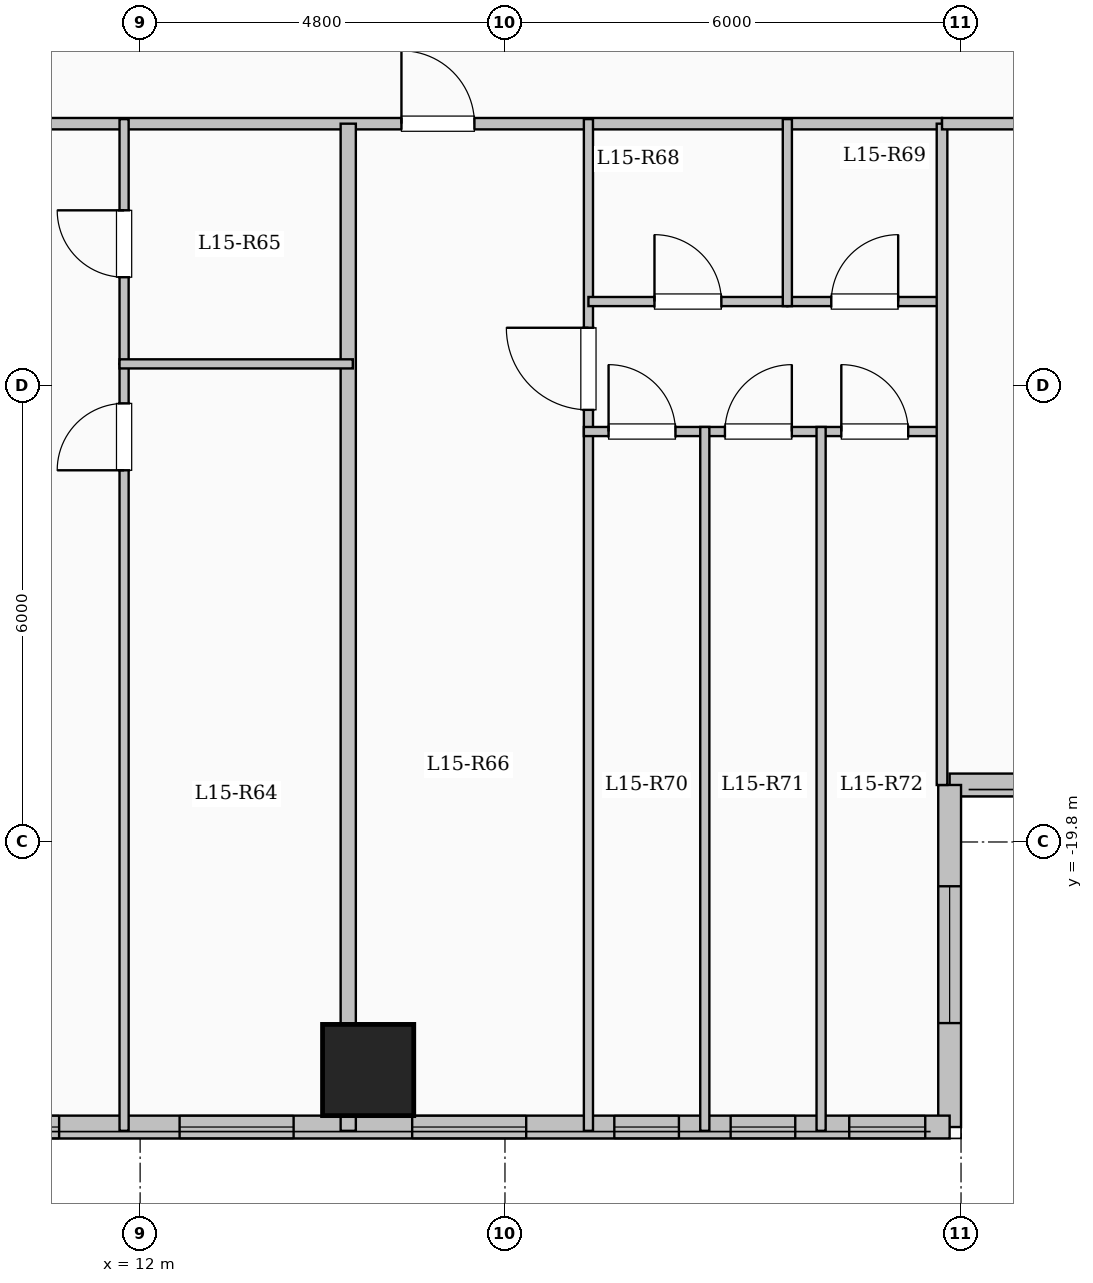
"""IFC4 building model, lengths in metres.
Left out: names, types, materials, properties, quantities, classifications, styles, units other than length and angle.
Written with IfcOpenShell. Run it as: python <this file> out.ifc"""

import sys

from ifc_helpers import new_model, si_unit, direction, frame, frame_2d, origin, origin_2d, place, context, subcontext, project, spatial, rectangle, extrude, element, fill, save


model = new_model("IFC4")
c1 = context("Model", 3, precision=1e-05, world=origin(), true_north=direction((0.0, 1.0)))
c2 = subcontext(c1, "Body", "Model", "MODEL_VIEW")
j1 = project(units=[si_unit("LENGTHUNIT", "METRE"), si_unit("PLANEANGLEUNIT", "RADIAN")], contexts=[c1])
p1 = place(None, origin())
s1 = spatial("IfcSite", under=j1, at=p1, CompositionType="ELEMENT")
p2 = place(p1, origin())
s2 = spatial("IfcBuilding", under=s1, at=p2, CompositionType="ELEMENT")
p3 = place(p2, frame((0.0, 0.0, 57.5)))
s3 = spatial("IfcBuildingStorey", under=s2, at=p3, CompositionType="ELEMENT", Elevation=57.5)
p4 = place(p3, frame((15.0, -22.8, 0.0), z_axis=(0.0, 0.0, 1.0), x_axis=(1.0, 0.0, 0.0)))
e1 = element("IfcColumn", 1, at=p4, inside=s3, PredefinedType="COLUMN", context=c2, shape_type="SweptSolid", body=[
    extrude(rectangle(XDim=1.2, YDim=1.2, at=origin_2d()), origin(), (0.0, 0.0, 1.0), 3.35),
])
p5 = place(p3, frame((28.65, -19.05, 0.0), z_axis=(0.0, 0.0, 1.0), x_axis=(-1.0, 0.0, 0.0)))
e2 = element("IfcWall", 2, at=p5, inside=s3, PredefinedType="SOLIDWALL", context=c2, shape_type="SweptSolid", body=[
    extrude(rectangle(XDim=6.0, YDim=0.3, at=frame_2d((3.0, 0.0))), origin(), (0.0, 0.0, 1.0), 3.1),
])
p6 = place(p5, frame((1.825, 0.0, 0.9)))
e3 = element("IfcOpeningElement", 3, at=p6, cuts=e2, PredefinedType="OPENING", context=c2, shape_type="SweptSolid", body=[
    extrude(rectangle(XDim=2.4, YDim=1.8, at=frame_2d((1.2, 0.9))), frame((0.0, 0.16, 0.0), z_axis=(0.0, -1.0, 0.0), x_axis=(1.0, 0.0, 0.0)), (0.0, 0.0, 1.0), 0.32),
])
p7 = place(p3, frame((22.65, -19.05, 0.0), z_axis=(0.0, 0.0, 1.0), x_axis=(0.0, -1.0, 0.0)))
e4 = element("IfcWall", 4, at=p7, inside=s3, PredefinedType="SOLIDWALL", context=c2, shape_type="SweptSolid", body=[
    extrude(rectangle(XDim=4.5, YDim=0.3, at=frame_2d((2.25, 0.0))), origin(), (0.0, 0.0, 1.0), 3.1),
])
p8 = place(p7, frame((1.333, 0.0, 0.9)))
e5 = element("IfcOpeningElement", 5, at=p8, cuts=e4, PredefinedType="OPENING", context=c2, shape_type="SweptSolid", body=[
    extrude(rectangle(XDim=1.8, YDim=1.65, at=frame_2d((0.9, 0.825))), frame((0.0, 0.16, 0.0), z_axis=(0.0, -1.0, 0.0), x_axis=(1.0, 0.0, 0.0)), (0.0, 0.0, 1.0), 0.32),
])
p9 = place(p3, frame((22.65, -23.55, 0.0), z_axis=(0.0, 0.0, 1.0), x_axis=(-1.0, 0.0, 0.0)))
e6 = element("IfcWall", 6, at=p9, inside=s3, PredefinedType="SOLIDWALL", context=c2, shape_type="SweptSolid", body=[
    extrude(rectangle(XDim=15.3, YDim=0.3, at=frame_2d((7.65, 0.0))), origin(), (0.0, 0.0, 1.0), 3.1),
])
p10 = place(p9, frame((0.321, 0.0, 0.95)))
e7 = element("IfcOpeningElement", 7, at=p10, cuts=e6, PredefinedType="OPENING", context=c2, shape_type="SweptSolid", body=[
    extrude(rectangle(XDim=1.0, YDim=1.5, at=frame_2d((0.5, 0.75))), frame((0.0, 0.16, 0.0), z_axis=(0.0, -1.0, 0.0), x_axis=(1.0, 0.0, 0.0)), (0.0, 0.0, 1.0), 0.32),
])
p11 = place(p9, frame((2.031, 0.0, 0.95)))
e8 = element("IfcOpeningElement", 8, at=p11, cuts=e6, PredefinedType="OPENING", context=c2, shape_type="SweptSolid", body=[
    extrude(rectangle(XDim=0.85, YDim=1.5, at=frame_2d((0.425, 0.75))), frame((0.0, 0.16, 0.0), z_axis=(0.0, -1.0, 0.0), x_axis=(1.0, 0.0, 0.0)), (0.0, 0.0, 1.0), 0.32),
])
p12 = place(p9, frame((3.562, 0.0, 0.95)))
e9 = element("IfcOpeningElement", 9, at=p12, cuts=e6, PredefinedType="OPENING", context=c2, shape_type="SweptSolid", body=[
    extrude(rectangle(XDim=0.85, YDim=1.5, at=frame_2d((0.425, 0.75))), frame((0.0, 0.16, 0.0), z_axis=(0.0, -1.0, 0.0), x_axis=(1.0, 0.0, 0.0)), (0.0, 0.0, 1.0), 0.32),
])
p13 = place(p9, frame((5.571, 0.0, 0.9)))
e10 = element("IfcOpeningElement", 10, at=p13, cuts=e6, PredefinedType="OPENING", context=c2, shape_type="SweptSolid", body=[
    extrude(rectangle(XDim=1.5, YDim=1.65, at=frame_2d((0.75, 0.825))), frame((0.0, 0.16, 0.0), z_axis=(0.0, -1.0, 0.0), x_axis=(1.0, 0.0, 0.0)), (0.0, 0.0, 1.0), 0.32),
])
p14 = place(p9, frame((8.631, 0.0, 0.9)))
e11 = element("IfcOpeningElement", 11, at=p14, cuts=e6, PredefinedType="OPENING", context=c2, shape_type="SweptSolid", body=[
    extrude(rectangle(XDim=1.5, YDim=1.65, at=frame_2d((0.75, 0.825))), frame((0.0, 0.16, 0.0), z_axis=(0.0, -1.0, 0.0), x_axis=(1.0, 0.0, 0.0)), (0.0, 0.0, 1.0), 0.32),
])
p15 = place(p9, frame((11.716, 0.0, 0.9)))
e12 = element("IfcOpeningElement", 12, at=p15, cuts=e6, PredefinedType="OPENING", context=c2, shape_type="SweptSolid", body=[
    extrude(rectangle(XDim=1.5, YDim=1.65, at=frame_2d((0.75, 0.825))), frame((0.0, 0.16, 0.0), z_axis=(0.0, -1.0, 0.0), x_axis=(1.0, 0.0, 0.0)), (0.0, 0.0, 1.0), 0.32),
])
p16 = place(p9, frame((14.303, 0.0, 0.95)))
e13 = element("IfcOpeningElement", 13, at=p16, cuts=e6, PredefinedType="OPENING", context=c2, shape_type="SweptSolid", body=[
    extrude(rectangle(XDim=0.85, YDim=1.5, at=frame_2d((0.425, 0.75))), frame((0.0, 0.16, 0.0), z_axis=(0.0, -1.0, 0.0), x_axis=(1.0, 0.0, 0.0)), (0.0, 0.0, 1.0), 0.32),
])
p17 = place(p3, frame((8.55, -10.35, 0.0), z_axis=(0.0, 0.0, 1.0), x_axis=(1.0, 0.0, 0.0)))
e14 = element("IfcWall", 14, at=p17, inside=s3, PredefinedType="PARTITIONING", context=c2, shape_type="SweptSolid", body=[
    extrude(rectangle(XDim=14.0, YDim=0.15, at=frame_2d((7.0, 0.0))), origin(), (0.0, 0.0, 1.0), 3.1),
])
p18 = place(p17, frame((0.75, 0.0, 0.0)))
e15 = element("IfcOpeningElement", 15, at=p18, cuts=e14, PredefinedType="OPENING", context=c2, shape_type="SweptSolid", body=[
    extrude(rectangle(XDim=0.96, YDim=2.15, at=frame_2d((0.48, 1.075))), frame((0.0, 0.085, 0.0), z_axis=(0.0, -1.0, 0.0), x_axis=(1.0, 0.0, 0.0)), (0.0, 0.0, 1.0), 0.17),
])
p19 = place(p17, frame((6.888, 0.0, 0.0)))
e16 = element("IfcOpeningElement", 16, at=p19, cuts=e14, PredefinedType="OPENING", context=c2, shape_type="SweptSolid", body=[
    extrude(rectangle(XDim=0.96, YDim=2.15, at=frame_2d((0.48, 1.075))), frame((0.0, 0.085, 0.0), z_axis=(0.0, -1.0, 0.0), x_axis=(1.0, 0.0, 0.0)), (0.0, 0.0, 1.0), 0.17),
])
p20 = place(p3, frame((14.738, -23.6, 0.0), z_axis=(0.0, 0.0, 1.0), x_axis=(0.0, 1.0, 0.0)))
e17 = element("IfcWall", 17, at=p20, inside=s3, PredefinedType="SOLIDWALL", context=c2, shape_type="SweptSolid", body=[
    extrude(rectangle(XDim=13.25, YDim=0.2, at=frame_2d((6.625, 0.0))), origin(), (0.0, 0.0, 1.0), 2.435),
])
p21 = place(p3, frame((11.789, -23.6, 0.0), z_axis=(0.0, 0.0, 1.0), x_axis=(0.0, 1.0, 0.0)))
e18 = element("IfcWall", 18, at=p21, inside=s3, PredefinedType="PARTITIONING", context=c2, shape_type="SweptSolid", body=[
    extrude(rectangle(XDim=10.09, YDim=0.12, at=frame_2d((5.045, 0.0))), origin(), (0.0, 0.0, 1.0), 3.1),
])
p22 = place(p21, frame((8.69, 0.0, 0.0)))
e19 = element("IfcOpeningElement", 19, at=p22, cuts=e18, PredefinedType="OPENING", context=c2, shape_type="SweptSolid", body=[
    extrude(rectangle(XDim=0.88, YDim=2.1, at=frame_2d((0.44, 1.05))), frame((0.0, 0.07, 0.0), z_axis=(0.0, -1.0, 0.0), x_axis=(1.0, 0.0, 0.0)), (0.0, 0.0, 1.0), 0.14),
])
p23 = place(p3, frame((11.789, -13.51, 0.0), z_axis=(0.0, 0.0, 1.0), x_axis=(0.0, 1.0, 0.0)))
e20 = element("IfcWall", 20, at=p23, inside=s3, PredefinedType="PARTITIONING", context=c2, shape_type="SweptSolid", body=[
    extrude(rectangle(XDim=3.22, YDim=0.12, at=frame_2d((1.61, 0.0))), origin(), (0.0, 0.0, 1.0), 3.1),
])
p24 = place(p23, frame((1.14, 0.0, 0.0)))
e21 = element("IfcOpeningElement", 21, at=p24, cuts=e20, PredefinedType="OPENING", context=c2, shape_type="SweptSolid", body=[
    extrude(rectangle(XDim=0.88, YDim=2.1, at=frame_2d((0.44, 1.05))), frame((0.0, 0.07, 0.0), z_axis=(0.0, -1.0, 0.0), x_axis=(1.0, 0.0, 0.0)), (0.0, 0.0, 1.0), 0.14),
])
p25 = place(p3, frame((11.729, -13.51, 0.0), z_axis=(0.0, 0.0, 1.0), x_axis=(1.0, 0.0, 0.0)))
e22 = element("IfcWall", 22, at=p25, inside=s3, PredefinedType="PARTITIONING", context=c2, shape_type="SweptSolid", body=[
    extrude(rectangle(XDim=3.069, YDim=0.12, at=frame_2d((1.535, 0.0))), origin(), (0.0, 0.0, 1.0), 3.1),
])
p26 = place(p3, frame((17.898, -23.6, 0.0), z_axis=(0.0, 0.0, 1.0), x_axis=(0.0, 1.0, 0.0)))
e23 = element("IfcWall", 23, at=p26, inside=s3, PredefinedType="PARTITIONING", context=c2, shape_type="SweptSolid", body=[
    extrude(rectangle(XDim=13.31, YDim=0.12, at=frame_2d((6.655, 0.0))), origin(), (0.0, 0.0, 1.0), 3.1),
])
p27 = place(p26, frame((9.485, 0.0, 0.0)))
e24 = element("IfcOpeningElement", 24, at=p27, cuts=e23, PredefinedType="OPENING", context=c2, shape_type="SweptSolid", body=[
    extrude(rectangle(XDim=1.08, YDim=2.15, at=frame_2d((0.54, 1.075))), frame((0.0, 0.07, 0.0), z_axis=(0.0, -1.0, 0.0), x_axis=(1.0, 0.0, 0.0)), (0.0, 0.0, 1.0), 0.14),
])
p28 = place(p3, frame((17.898, -12.69, 0.0), z_axis=(0.0, 0.0, 1.0), x_axis=(1.0, 0.0, 0.0)))
e25 = element("IfcWall", 25, at=p28, inside=s3, PredefinedType="PARTITIONING", context=c2, shape_type="SweptSolid", body=[
    extrude(rectangle(XDim=2.617, YDim=0.12, at=frame_2d((1.309, 0.0))), origin(), (0.0, 0.0, 1.0), 3.1),
])
p29 = place(p28, frame((0.869, 0.0, 0.0)))
e26 = element("IfcOpeningElement", 26, at=p29, cuts=e25, PredefinedType="OPENING", context=c2, shape_type="SweptSolid", body=[
    extrude(rectangle(XDim=0.88, YDim=2.1, at=frame_2d((0.44, 1.05))), frame((0.0, 0.07, 0.0), z_axis=(0.0, -1.0, 0.0), x_axis=(1.0, 0.0, 0.0)), (0.0, 0.0, 1.0), 0.14),
])
p30 = place(p3, frame((20.515, -12.69, 0.0), z_axis=(0.0, 0.0, 1.0), x_axis=(1.0, 0.0, 0.0)))
e27 = element("IfcWall", 27, at=p30, inside=s3, PredefinedType="PARTITIONING", context=c2, shape_type="SweptSolid", body=[
    extrude(rectangle(XDim=2.035, YDim=0.12, at=frame_2d((1.018, 0.0))), origin(), (0.0, 0.0, 1.0), 3.1),
])
p31 = place(p30, frame((0.578, 0.0, 0.0)))
e28 = element("IfcOpeningElement", 28, at=p31, cuts=e27, PredefinedType="OPENING", context=c2, shape_type="SweptSolid", body=[
    extrude(rectangle(XDim=0.88, YDim=2.1, at=frame_2d((0.44, 1.05))), frame((0.0, 0.07, 0.0), z_axis=(0.0, -1.0, 0.0), x_axis=(1.0, 0.0, 0.0)), (0.0, 0.0, 1.0), 0.14),
])
p32 = place(p3, frame((17.838, -14.4, 0.0), z_axis=(0.0, 0.0, 1.0), x_axis=(1.0, 0.0, 0.0)))
e29 = element("IfcWall", 29, at=p32, inside=s3, PredefinedType="PARTITIONING", context=c2, shape_type="SweptSolid", body=[
    extrude(rectangle(XDim=4.772, YDim=0.12, at=frame_2d((2.386, 0.0))), origin(), (0.0, 0.0, 1.0), 3.1),
])
p33 = place(p32, frame((0.325, 0.0, 0.0)))
e30 = element("IfcOpeningElement", 30, at=p33, cuts=e29, PredefinedType="OPENING", context=c2, shape_type="SweptSolid", body=[
    extrude(rectangle(XDim=0.88, YDim=2.1, at=frame_2d((0.44, 1.05))), frame((0.0, 0.07, 0.0), z_axis=(0.0, -1.0, 0.0), x_axis=(1.0, 0.0, 0.0)), (0.0, 0.0, 1.0), 0.14),
])
p34 = place(p32, frame((1.856, 0.0, 0.0)))
e31 = element("IfcOpeningElement", 31, at=p34, cuts=e29, PredefinedType="OPENING", context=c2, shape_type="SweptSolid", body=[
    extrude(rectangle(XDim=0.88, YDim=2.1, at=frame_2d((0.44, 1.05))), frame((0.0, 0.07, 0.0), z_axis=(0.0, -1.0, 0.0), x_axis=(1.0, 0.0, 0.0)), (0.0, 0.0, 1.0), 0.14),
])
p35 = place(p32, frame((3.387, 0.0, 0.0)))
e32 = element("IfcOpeningElement", 32, at=p35, cuts=e29, PredefinedType="OPENING", context=c2, shape_type="SweptSolid", body=[
    extrude(rectangle(XDim=0.88, YDim=2.1, at=frame_2d((0.44, 1.05))), frame((0.0, 0.07, 0.0), z_axis=(0.0, -1.0, 0.0), x_axis=(1.0, 0.0, 0.0)), (0.0, 0.0, 1.0), 0.14),
])
p36 = place(p3, frame((20.515, -12.75, 0.0), z_axis=(0.0, 0.0, 1.0), x_axis=(0.0, 1.0, 0.0)))
e33 = element("IfcWall", 33, at=p36, inside=s3, PredefinedType="PARTITIONING", context=c2, shape_type="SweptSolid", body=[
    extrude(rectangle(XDim=2.46, YDim=0.12, at=frame_2d((1.23, 0.0))), origin(), (0.0, 0.0, 1.0), 3.1),
])
for number, where, z_axis, x_axis in (
    (34, (19.429, -23.6, 0.0), (0.0, 0.0, 1.0), (0.0, 1.0, 0.0)),
    (35, (20.959, -23.6, 0.0), (0.0, 0.0, 1.0), (0.0, 1.0, 0.0)),
):
    element("IfcWall", number, at=place(p3, frame(where, z_axis=z_axis, x_axis=x_axis)), inside=s3, PredefinedType="PARTITIONING", context=c2, shape_type="SweptSolid", body=[
        extrude(rectangle(XDim=9.26, YDim=0.12, at=frame_2d((4.63, 0.0))), origin(), (0.0, 0.0, 1.0), 3.1),
    ])
p37 = place(p3, frame((22.55, -19.05, 0.0), z_axis=(0.0, 0.0, 1.0), x_axis=(0.0, 1.0, 0.0)))
e36 = element("IfcWall", 36, at=p37, inside=s3, PredefinedType="PARTITIONING", context=c2, shape_type="SweptSolid", body=[
    extrude(rectangle(XDim=8.7, YDim=0.14, at=frame_2d((4.35, 0.0))), origin(), (0.0, 0.0, 1.0), 3.1),
])
p38 = place(p3, frame((22.55, -10.35, 0.0), z_axis=(0.0, 0.0, 1.0), x_axis=(1.0, 0.0, 0.0)))
e37 = element("IfcWall", 37, at=p38, inside=s3, PredefinedType="PARTITIONING", context=c2, shape_type="SweptSolid", body=[
    extrude(rectangle(XDim=6.13, YDim=0.15, at=frame_2d((3.065, 0.0))), origin(), (0.0, 0.0, 1.0), 3.1),
])
p39 = place(p38, frame((2.59, 0.0, 0.0)))
e38 = element("IfcOpeningElement", 38, at=p39, cuts=e37, PredefinedType="OPENING", context=c2, shape_type="SweptSolid", body=[
    extrude(rectangle(XDim=0.95, YDim=2.15, at=frame_2d((0.475, 1.075))), frame((0.0, 0.085, 0.0), z_axis=(0.0, -1.0, 0.0), x_axis=(1.0, 0.0, 0.0)), (0.0, 0.0, 1.0), 0.17),
])
p40 = place(p8, origin())
e39 = element("IfcWindow", 39, at=p40, inside=s3, PartitioningType="SINGLE_PANEL", PredefinedType="WINDOW", context=c2, shape_type="SweptSolid", body=[
    extrude(rectangle(XDim=1.8, YDim=1.65, at=frame_2d((0.9, 0.825))), frame((0.0, 0.03, 0.0), z_axis=(0.0, -1.0, 0.0), x_axis=(1.0, 0.0, 0.0)), (0.0, 0.0, 1.0), 0.06),
])
fill(e5, e39)
p41 = place(p10, origin())
e40 = element("IfcWindow", 40, at=p41, inside=s3, PartitioningType="SINGLE_PANEL", PredefinedType="WINDOW", context=c2, shape_type="SweptSolid", body=[
    extrude(rectangle(XDim=1.0, YDim=1.5, at=frame_2d((0.5, 0.75))), frame((0.0, 0.03, 0.0), z_axis=(0.0, -1.0, 0.0), x_axis=(1.0, 0.0, 0.0)), (0.0, 0.0, 1.0), 0.06),
])
fill(e7, e40)
p42 = place(p11, origin())
e41 = element("IfcWindow", 41, at=p42, inside=s3, PartitioningType="SINGLE_PANEL", PredefinedType="WINDOW", context=c2, shape_type="SweptSolid", body=[
    extrude(rectangle(XDim=0.85, YDim=1.5, at=frame_2d((0.425, 0.75))), frame((0.0, 0.03, 0.0), z_axis=(0.0, -1.0, 0.0), x_axis=(1.0, 0.0, 0.0)), (0.0, 0.0, 1.0), 0.06),
])
fill(e8, e41)
p43 = place(p12, origin())
e42 = element("IfcWindow", 42, at=p43, inside=s3, PartitioningType="SINGLE_PANEL", PredefinedType="WINDOW", context=c2, shape_type="SweptSolid", body=[
    extrude(rectangle(XDim=0.85, YDim=1.5, at=frame_2d((0.425, 0.75))), frame((0.0, 0.03, 0.0), z_axis=(0.0, -1.0, 0.0), x_axis=(1.0, 0.0, 0.0)), (0.0, 0.0, 1.0), 0.06),
])
fill(e9, e42)
p44 = place(p13, origin())
e43 = element("IfcWindow", 43, at=p44, inside=s3, PartitioningType="SINGLE_PANEL", PredefinedType="WINDOW", context=c2, shape_type="SweptSolid", body=[
    extrude(rectangle(XDim=1.5, YDim=1.65, at=frame_2d((0.75, 0.825))), frame((0.0, 0.03, 0.0), z_axis=(0.0, -1.0, 0.0), x_axis=(1.0, 0.0, 0.0)), (0.0, 0.0, 1.0), 0.06),
])
fill(e10, e43)
p45 = place(p14, origin())
e44 = element("IfcWindow", 44, at=p45, inside=s3, PartitioningType="SINGLE_PANEL", PredefinedType="WINDOW", context=c2, shape_type="SweptSolid", body=[
    extrude(rectangle(XDim=1.5, YDim=1.65, at=frame_2d((0.75, 0.825))), frame((0.0, 0.03, 0.0), z_axis=(0.0, -1.0, 0.0), x_axis=(1.0, 0.0, 0.0)), (0.0, 0.0, 1.0), 0.06),
])
fill(e11, e44)
p46 = place(p15, origin())
e45 = element("IfcWindow", 45, at=p46, inside=s3, PartitioningType="SINGLE_PANEL", PredefinedType="WINDOW", context=c2, shape_type="SweptSolid", body=[
    extrude(rectangle(XDim=1.5, YDim=1.65, at=frame_2d((0.75, 0.825))), frame((0.0, 0.03, 0.0), z_axis=(0.0, -1.0, 0.0), x_axis=(1.0, 0.0, 0.0)), (0.0, 0.0, 1.0), 0.06),
])
fill(e12, e45)
p47 = place(p22, origin())
e46 = element("IfcDoor", 46, at=p47, inside=s3, OperationType="SINGLE_SWING_LEFT", PredefinedType="DOOR", context=c2, shape_type="SweptSolid", body=[
    extrude(rectangle(XDim=0.88, YDim=2.1, at=frame_2d((0.44, 1.05))), frame((0.0, 0.025, 0.0), z_axis=(0.0, -1.0, 0.0), x_axis=(1.0, 0.0, 0.0)), (0.0, 0.0, 1.0), 0.05),
])
fill(e19, e46)
p48 = place(p24, origin())
e47 = element("IfcDoor", 47, at=p48, inside=s3, OperationType="SINGLE_SWING_RIGHT", PredefinedType="DOOR", context=c2, shape_type="SweptSolid", body=[
    extrude(rectangle(XDim=0.88, YDim=2.1, at=frame_2d((0.44, 1.05))), frame((0.0, 0.025, 0.0), z_axis=(0.0, -1.0, 0.0), x_axis=(1.0, 0.0, 0.0)), (0.0, 0.0, 1.0), 0.05),
])
fill(e21, e47)
p49 = place(p19, origin())
e48 = element("IfcDoor", 48, at=p49, inside=s3, OperationType="SINGLE_SWING_LEFT", PredefinedType="DOOR", context=c2, shape_type="SweptSolid", body=[
    extrude(rectangle(XDim=0.96, YDim=2.15, at=frame_2d((0.48, 1.075))), frame((0.0, 0.025, 0.0), z_axis=(0.0, -1.0, 0.0), x_axis=(1.0, 0.0, 0.0)), (0.0, 0.0, 1.0), 0.05),
])
fill(e16, e48)
p50 = place(p27, origin())
e49 = element("IfcDoor", 49, at=p50, inside=s3, OperationType="SINGLE_SWING_RIGHT", PredefinedType="DOOR", context=c2, shape_type="SweptSolid", body=[
    extrude(rectangle(XDim=1.08, YDim=2.15, at=frame_2d((0.54, 1.075))), frame((0.0, 0.025, 0.0), z_axis=(0.0, -1.0, 0.0), x_axis=(1.0, 0.0, 0.0)), (0.0, 0.0, 1.0), 0.05),
])
fill(e24, e49)
p51 = place(p29, origin())
e50 = element("IfcDoor", 50, at=p51, inside=s3, OperationType="SINGLE_SWING_LEFT", PredefinedType="DOOR", context=c2, shape_type="SweptSolid", body=[
    extrude(rectangle(XDim=0.88, YDim=2.1, at=frame_2d((0.44, 1.05))), frame((0.0, 0.025, 0.0), z_axis=(0.0, -1.0, 0.0), x_axis=(1.0, 0.0, 0.0)), (0.0, 0.0, 1.0), 0.05),
])
fill(e26, e50)
p52 = place(p31, origin())
e51 = element("IfcDoor", 51, at=p52, inside=s3, OperationType="SINGLE_SWING_RIGHT", PredefinedType="DOOR", context=c2, shape_type="SweptSolid", body=[
    extrude(rectangle(XDim=0.88, YDim=2.1, at=frame_2d((0.44, 1.05))), frame((0.0, 0.025, 0.0), z_axis=(0.0, -1.0, 0.0), x_axis=(1.0, 0.0, 0.0)), (0.0, 0.0, 1.0), 0.05),
])
fill(e28, e51)
p53 = place(p33, origin())
e52 = element("IfcDoor", 52, at=p53, inside=s3, OperationType="SINGLE_SWING_LEFT", PredefinedType="DOOR", context=c2, shape_type="SweptSolid", body=[
    extrude(rectangle(XDim=0.88, YDim=2.1, at=frame_2d((0.44, 1.05))), frame((0.0, 0.025, 0.0), z_axis=(0.0, -1.0, 0.0), x_axis=(1.0, 0.0, 0.0)), (0.0, 0.0, 1.0), 0.05),
])
fill(e30, e52)
p54 = place(p34, origin())
e53 = element("IfcDoor", 53, at=p54, inside=s3, OperationType="SINGLE_SWING_RIGHT", PredefinedType="DOOR", context=c2, shape_type="SweptSolid", body=[
    extrude(rectangle(XDim=0.88, YDim=2.1, at=frame_2d((0.44, 1.05))), frame((0.0, 0.025, 0.0), z_axis=(0.0, -1.0, 0.0), x_axis=(1.0, 0.0, 0.0)), (0.0, 0.0, 1.0), 0.05),
])
fill(e31, e53)
p55 = place(p35, origin())
e54 = element("IfcDoor", 54, at=p55, inside=s3, OperationType="SINGLE_SWING_LEFT", PredefinedType="DOOR", context=c2, shape_type="SweptSolid", body=[
    extrude(rectangle(XDim=0.88, YDim=2.1, at=frame_2d((0.44, 1.05))), frame((0.0, 0.025, 0.0), z_axis=(0.0, -1.0, 0.0), x_axis=(1.0, 0.0, 0.0)), (0.0, 0.0, 1.0), 0.05),
])
fill(e32, e54)
save(model, sys.argv[1])
